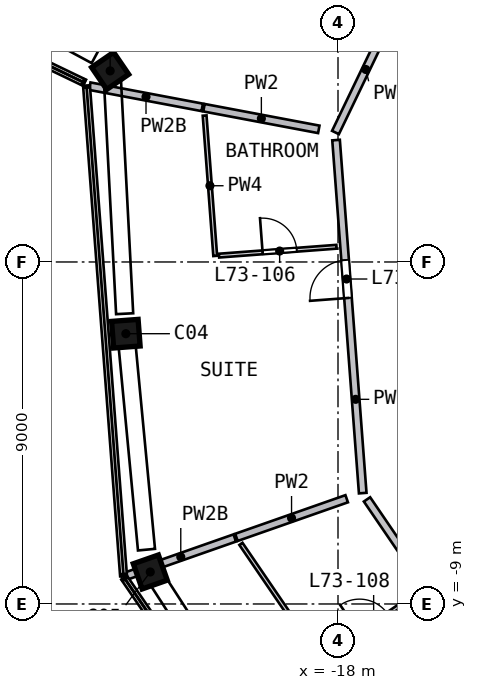
"""IFC4 building model, lengths in metres.
Left out: names, types, materials, properties, quantities, classifications, styles, units other than length and angle.
Written with IfcOpenShell. Run it as: python <this file> out.ifc"""

import sys

from ifc_helpers import new_model, si_unit, direction, frame, frame_2d, origin, origin_2d, place, context, subcontext, project, spatial, rectangle, extrude, element, fill, save


model = new_model("IFC4")
c1 = context("Model", 3, precision=1e-05, world=origin(), true_north=direction((0.0, 1.0)))
c2 = subcontext(c1, "Body", "Model", "MODEL_VIEW")
j1 = project(units=[si_unit("LENGTHUNIT", "METRE"), si_unit("PLANEANGLEUNIT", "RADIAN")], contexts=[c1])
p1 = place(None, origin())
s1 = spatial("IfcSite", under=j1, at=p1, CompositionType="ELEMENT")
p2 = place(p1, origin())
s2 = spatial("IfcBuilding", under=s1, at=p2, CompositionType="ELEMENT")
p3 = place(p2, frame((0.0, 0.0, 295.0)))
s3 = spatial("IfcBuildingStorey", under=s2, at=p3, CompositionType="ELEMENT", Elevation=295.0)
p4 = place(p3, frame((-23.973, 5.136, 0.0), z_axis=(-0.018278471, -0.089071279, 0.995857522), x_axis=(-0.566324242, 0.821763084, 0.063105361)))
e1 = element("IfcColumn", 1, at=p4, inside=s3, PredefinedType="COLUMN", context=c2, shape_type="SweptSolid", body=[
    extrude(rectangle(XDim=0.7, YDim=0.7, at=origin_2d()), origin(), (0.0, 0.0, 1.0), 4.207),
])
p5 = place(p3, frame((-23.591, -1.782, 0.0), z_axis=(0.007313464, -0.087471347, 0.996140189), x_axis=(0.074613173, -0.993342185, -0.087773449)))
e2 = element("IfcColumn", 2, at=p5, inside=s3, PredefinedType="COLUMN", context=c2, shape_type="SweptSolid", body=[
    extrude(rectangle(XDim=0.7, YDim=0.7, at=origin_2d()), origin(), (0.0, 0.0, 1.0), 4.206),
])
p6 = place(p3, frame((-22.977, -8.055, 0.0), z_axis=(0.030581945, -0.084956294, 0.995915244), x_axis=(-0.329386102, 0.939868366, 0.090289813)))
e3 = element("IfcColumn", 3, at=p6, inside=s3, PredefinedType="COLUMN", context=c2, shape_type="SweptSolid", body=[
    extrude(rectangle(XDim=0.7, YDim=0.7, at=origin_2d()), origin(), (0.0, 0.0, 1.0), 4.207),
])
p7 = place(p3, frame((-17.35, -6.083, 0.0), z_axis=(0.0, 0.0, 1.0), x_axis=(-0.075311748, 0.997160038, 0.0)))
e4 = element("IfcWall", 4, at=p7, inside=s3, PredefinedType="SOLIDWALL", context=c2, shape_type="SweptSolid", body=[
    extrude(rectangle(XDim=9.317, YDim=0.2, at=frame_2d((4.658, 0.0))), origin(), (0.0, 0.0, 1.0), 4.19),
])
p8 = place(p7, frame((5.15, 0.0, 0.0)))
e5 = element("IfcOpeningElement", 5, at=p8, cuts=e4, PredefinedType="OPENING", context=c2, shape_type="SweptSolid", body=[
    extrude(rectangle(XDim=1.0, YDim=2.1, at=frame_2d((0.5, 1.05))), frame((0.0, 0.11, 0.0), z_axis=(0.0, -1.0, 0.0), x_axis=(1.0, 0.0, 0.0)), (0.0, 0.0, 1.0), 0.22),
])
p9 = place(p3, frame((-18.066, 3.407, 0.0), z_axis=(0.0, 0.0, 1.0), x_axis=(0.433334957, 0.901232942, 0.0)))
e6 = element("IfcWall", 6, at=p9, inside=s3, PredefinedType="SOLIDWALL", context=c2, shape_type="SweptSolid", body=[
    extrude(rectangle(XDim=9.317, YDim=0.2, at=frame_2d((4.658, 0.0))), origin(), (0.0, 0.0, 1.0), 4.19),
])
p10 = place(p9, frame((3.881, 0.0, 0.0)))
e7 = element("IfcOpeningElement", 7, at=p10, cuts=e6, PredefinedType="OPENING", context=c2, shape_type="SweptSolid", body=[
    extrude(rectangle(XDim=1.8, YDim=2.1, at=frame_2d((0.9, 1.05))), frame((0.0, 0.11, 0.0), z_axis=(0.0, -1.0, 0.0), x_axis=(1.0, 0.0, 0.0)), (0.0, 0.0, 1.0), 0.22),
])
p11 = place(p3, frame((-11.984, -13.942, 0.0), z_axis=(0.0, 0.0, 1.0), x_axis=(-0.563822163, 0.825896222, 0.0)))
e8 = element("IfcWall", 8, at=p11, inside=s3, PredefinedType="SOLIDWALL", context=c2, shape_type="SweptSolid", body=[
    extrude(rectangle(XDim=9.317, YDim=0.2, at=frame_2d((4.658, 0.0))), origin(), (0.0, 0.0, 1.0), 4.19),
])
p12 = place(p11, frame((5.15, 0.0, 0.0)))
e9 = element("IfcOpeningElement", 9, at=p12, cuts=e8, PredefinedType="OPENING", context=c2, shape_type="SweptSolid", body=[
    extrude(rectangle(XDim=1.0, YDim=2.1, at=frame_2d((0.5, 1.05))), frame((0.0, 0.11, 0.0), z_axis=(0.0, -1.0, 0.0), x_axis=(1.0, 0.0, 0.0)), (0.0, 0.0, 1.0), 0.22),
])
p13 = place(p3, frame((-21.573, 4.068, 0.0), z_axis=(0.0, 0.0, 1.0), x_axis=(-0.982673358, 0.185345817, 0.0)))
e10 = element("IfcWall", 10, at=p13, inside=s3, PredefinedType="SOLIDWALL", context=c2, shape_type="SweptSolid", body=[
    extrude(rectangle(XDim=3.011, YDim=0.2, at=frame_2d((1.506, 0.0))), origin(), (0.0, 0.0, 1.0), 3.69),
])
p14 = place(p3, frame((-20.716, -7.263, 0.0), z_axis=(0.0, 0.0, 1.0), x_axis=(-0.94368127, -0.330855951, 0.0)))
e11 = element("IfcWall", 11, at=p14, inside=s3, PredefinedType="SOLIDWALL", context=c2, shape_type="SweptSolid", body=[
    extrude(rectangle(XDim=3.011, YDim=0.2, at=frame_2d((1.506, 0.0))), origin(), (0.0, 0.0, 1.0), 3.69),
])
p15 = place(p3, frame((-18.506, 3.49, 0.0), z_axis=(0.0, 0.0, 1.0), x_axis=(-0.982674754, 0.185338414, 0.0)))
e12 = element("IfcWall", 12, at=p15, inside=s3, PredefinedType="SOLIDWALL", context=c2, shape_type="SweptSolid", body=[
    extrude(rectangle(XDim=3.074, YDim=0.2, at=frame_2d((1.537, 0.0))), origin(), (0.0, 0.0, 1.0), 4.19),
])
p16 = place(p3, frame((-17.771, -6.23, 0.0), z_axis=(0.0, 0.0, 1.0), x_axis=(-0.943678725, -0.33086321, 0.0)))
e13 = element("IfcWall", 13, at=p16, inside=s3, PredefinedType="SOLIDWALL", context=c2, shape_type="SweptSolid", body=[
    extrude(rectangle(XDim=3.075, YDim=0.2, at=frame_2d((1.537, 0.0))), origin(), (0.0, 0.0, 1.0), 4.19),
])
p17 = place(p3, frame((-21.231, 0.159, 0.0), z_axis=(0.0, 0.0, 1.0), x_axis=(-0.075335572, 0.997158238, 0.0)))
e14 = element("IfcWall", 14, at=p17, inside=s3, PredefinedType="PARTITIONING", context=c2, shape_type="SweptSolid", body=[
    extrude(rectangle(XDim=3.704, YDim=0.1, at=frame_2d((1.852, 0.0))), origin(), (0.0, 0.0, 1.0), 4.19),
])
p18 = place(p3, frame((-21.131, 0.167, 0.0), z_axis=(0.0, 0.0, 1.0), x_axis=(0.997155975, 0.075365524, 0.0)))
e15 = element("IfcWall", 15, at=p18, inside=s3, PredefinedType="PARTITIONING", context=c2, shape_type="SweptSolid", body=[
    extrude(rectangle(XDim=3.1, YDim=0.1, at=frame_2d((1.55, 0.0))), origin(), (0.0, 0.0, 1.0), 4.19),
])
p19 = place(p18, frame((1.15, 0.0, 0.0)))
e16 = element("IfcOpeningElement", 16, at=p19, cuts=e15, PredefinedType="OPENING", context=c2, shape_type="SweptSolid", body=[
    extrude(rectangle(XDim=0.9, YDim=2.1, at=frame_2d((0.45, 1.05))), frame((0.0, 0.06, 0.0), z_axis=(0.0, -1.0, 0.0), x_axis=(1.0, 0.0, 0.0)), (0.0, 0.0, 1.0), 0.12),
])
p20 = place(p3, frame((-18.466, -10.477, 0.0), z_axis=(0.0, 0.0, 1.0), x_axis=(-0.563792809, 0.82591626, 0.0)))
e17 = element("IfcWall", 17, at=p20, inside=s3, PredefinedType="PARTITIONING", context=c2, shape_type="SweptSolid", body=[
    extrude(rectangle(XDim=3.704, YDim=0.1, at=frame_2d((1.852, 0.0))), origin(), (0.0, 0.0, 1.0), 4.19),
])
p21 = place(p3, frame((-18.384, -10.421, 0.0), z_axis=(0.0, 0.0, 1.0), x_axis=(0.825905634, 0.563808375, 0.0)))
e18 = element("IfcWall", 18, at=p21, inside=s3, PredefinedType="PARTITIONING", context=c2, shape_type="SweptSolid", body=[
    extrude(rectangle(XDim=3.1, YDim=0.1, at=frame_2d((1.55, 0.0))), origin(), (0.0, 0.0, 1.0), 4.19),
])
p22 = place(p21, frame((1.15, 0.0, 0.0)))
e19 = element("IfcOpeningElement", 19, at=p22, cuts=e18, PredefinedType="OPENING", context=c2, shape_type="SweptSolid", body=[
    extrude(rectangle(XDim=0.9, YDim=2.1, at=frame_2d((0.45, 1.05))), frame((0.0, 0.06, 0.0), z_axis=(0.0, -1.0, 0.0), x_axis=(1.0, 0.0, 0.0)), (0.0, 0.0, 1.0), 0.12),
])
p23 = place(p8, origin())
e20 = element("IfcDoor", 20, at=p23, inside=s3, OperationType="SINGLE_SWING_LEFT", PredefinedType="DOOR", context=c2, shape_type="SweptSolid", body=[
    extrude(rectangle(XDim=1.0, YDim=2.1, at=frame_2d((0.5, 1.05))), frame((0.0, 0.025, 0.0), z_axis=(0.0, -1.0, 0.0), x_axis=(1.0, 0.0, 0.0)), (0.0, 0.0, 1.0), 0.05),
])
fill(e5, e20)
p24 = place(p19, origin())
e21 = element("IfcDoor", 21, at=p24, inside=s3, OperationType="SINGLE_SWING_LEFT", PredefinedType="DOOR", context=c2, shape_type="SweptSolid", body=[
    extrude(rectangle(XDim=0.9, YDim=2.1, at=frame_2d((0.45, 1.05))), frame((0.0, 0.025, 0.0), z_axis=(0.0, -1.0, 0.0), x_axis=(1.0, 0.0, 0.0)), (0.0, 0.0, 1.0), 0.05),
])
fill(e16, e21)
save(model, sys.argv[1])
